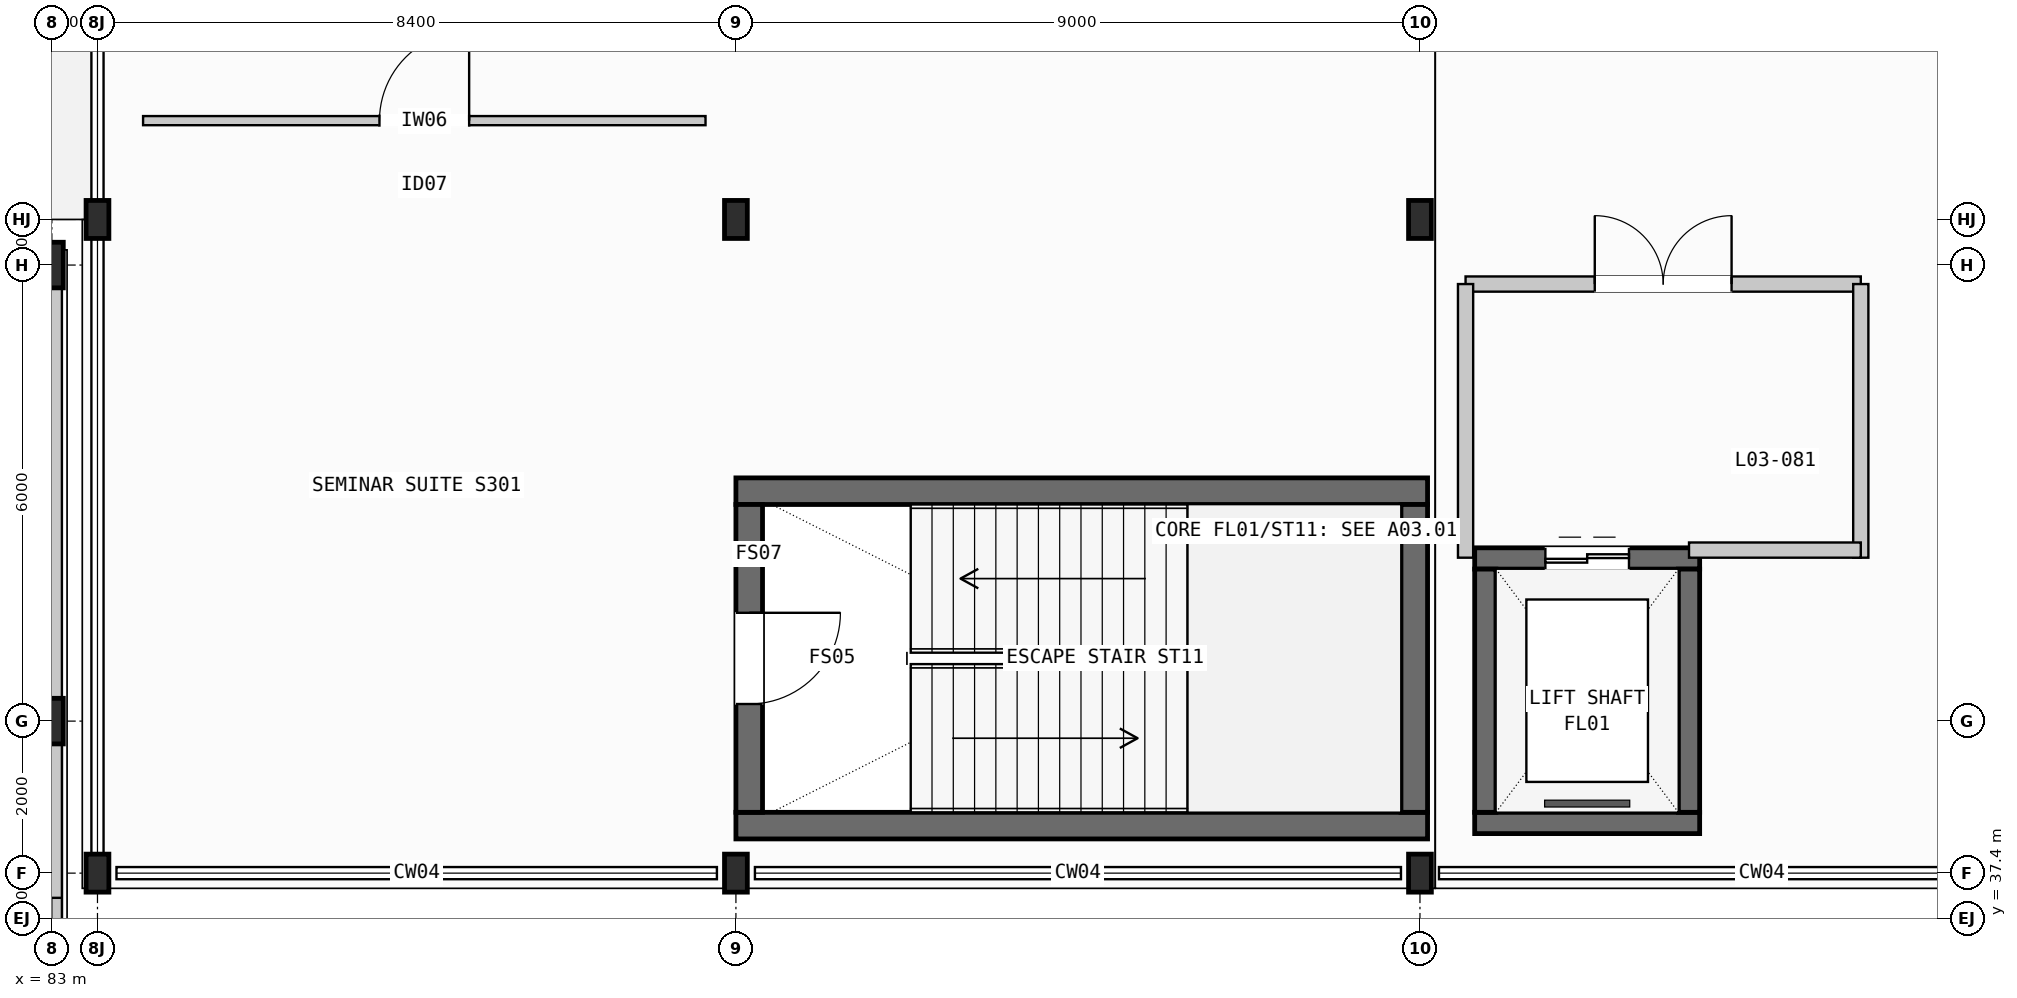
"""IFC4 building model, lengths in metres.
Left out: names, types, materials, properties, quantities, classifications, styles, units other than length and angle.
Written with IfcOpenShell. Run it as: python <this file> out.ifc"""

import sys

from ifc_helpers import new_model, si_unit, direction, frame, frame_2d, origin, origin_2d, place, context, subcontext, project, spatial, rectangle, i_section, extrude, element, fill, save


model = new_model("IFC4")
c1 = context("Model", 3, precision=1e-05, world=origin(), true_north=direction((0.0, 1.0)))
c2 = subcontext(c1, "Body", "Model", "MODEL_VIEW")
j1 = project(units=[si_unit("LENGTHUNIT", "METRE"), si_unit("PLANEANGLEUNIT", "RADIAN")], contexts=[c1])
p1 = place(None, origin())
s1 = spatial("IfcSite", under=j1, at=p1, CompositionType="ELEMENT")
p2 = place(p1, origin())
s2 = spatial("IfcBuilding", under=s1, at=p2, CompositionType="ELEMENT")
p3 = place(p2, frame((0.0, 0.0, 16.8)))
s3 = spatial("IfcBuildingStorey", under=s2, at=p3, CompositionType="ELEMENT", Elevation=16.8)
for number, where, z_axis, x_axis in (
    (1, (83.0, 40.0, 0.0), (0.0, 0.0, 1.0), (1.0, 0.0, 0.0)),
    (2, (83.0, 46.0, 0.0), (0.0, 0.0, 1.0), (1.0, 0.0, 0.0)),
):
    element("IfcColumn", number, at=place(p3, frame(where, z_axis=z_axis, x_axis=x_axis)), inside=s3, PredefinedType="COLUMN", context=c2, shape_type="SweptSolid", body=[
        extrude(i_section(OverallWidth=0.3, OverallDepth=0.6, WebThickness=0.015, FlangeThickness=0.03, FilletRadius=0.027, at=origin_2d()), origin(), (0.0, 0.0, 1.0), 5.2),
    ])
for number, where, z_axis, x_axis in (
    (3, (83.6, 38.0, 0.0), (0.0, 0.0, 1.0), (1.0, 0.0, 0.0)),
    (4, (83.6, 46.6, 0.0), (0.0, 0.0, 1.0), (1.0, 0.0, 0.0)),
    (5, (92.0, 38.0, 0.0), (0.0, 0.0, 1.0), (1.0, 0.0, 0.0)),
    (6, (92.0, 46.6, 0.0), (0.0, 0.0, 1.0), (1.0, 0.0, 0.0)),
    (7, (101.0, 38.0, 0.0), (0.0, 0.0, 1.0), (1.0, 0.0, 0.0)),
    (8, (101.0, 46.6, 0.0), (0.0, 0.0, 1.0), (1.0, 0.0, 0.0)),
):
    element("IfcColumn", number, at=place(p3, frame(where, z_axis=z_axis, x_axis=x_axis)), inside=s3, PredefinedType="COLUMN", context=c2, shape_type="SweptSolid", body=[
        extrude(i_section(OverallWidth=0.3, OverallDepth=0.5, WebThickness=0.014, FlangeThickness=0.028, FilletRadius=0.027, at=origin_2d()), origin(), (0.0, 0.0, 1.0), 4.8),
    ])
for number, where, z_axis, x_axis in (
    (9, (92.0, 38.625, 0.0), (0.0, 0.0, 1.0), (1.0, 0.0, 0.0)),
    (10, (92.0, 43.025, 0.0), (0.0, 0.0, 1.0), (1.0, 0.0, 0.0)),
):
    element("IfcWall", number, at=place(p3, frame(where, z_axis=z_axis, x_axis=x_axis)), inside=s3, PredefinedType="SHEAR", context=c2, shape_type="SweptSolid", body=[
        extrude(rectangle(XDim=9.1, YDim=0.35, at=frame_2d((4.55, 0.0))), origin(), (0.0, 0.0, 1.0), 4.8),
    ])
p4 = place(p3, frame((92.175, 38.8, 0.0), z_axis=(0.0, 0.0, 1.0), x_axis=(0.0, 1.0, 0.0)))
e11 = element("IfcWall", 11, at=p4, inside=s3, PredefinedType="SHEAR", context=c2, shape_type="SweptSolid", body=[
    extrude(rectangle(XDim=4.05, YDim=0.35, at=frame_2d((2.025, 0.0))), origin(), (0.0, 0.0, 1.0), 4.8),
])
p5 = place(p4, frame((1.425, 0.0, 0.0)))
e12 = element("IfcOpeningElement", 12, at=p5, cuts=e11, PredefinedType="OPENING", context=c2, shape_type="SweptSolid", body=[
    extrude(rectangle(XDim=1.2, YDim=2.2, at=frame_2d((0.6, 1.1))), frame((0.0, 0.185, 0.0), z_axis=(0.0, -1.0, 0.0), x_axis=(1.0, 0.0, 0.0)), (0.0, 0.0, 1.0), 0.37),
])
p6 = place(p3, frame((100.925, 38.8, 0.0), z_axis=(0.0, 0.0, 1.0), x_axis=(0.0, 1.0, 0.0)))
e13 = element("IfcWall", 13, at=p6, inside=s3, PredefinedType="SHEAR", context=c2, shape_type="SweptSolid", body=[
    extrude(rectangle(XDim=4.05, YDim=0.35, at=frame_2d((2.025, 0.0))), origin(), (0.0, 0.0, 1.0), 4.8),
])
p7 = place(p3, frame((101.72, 38.66, 0.0), z_axis=(0.0, 0.0, 1.0), x_axis=(1.0, 0.0, 0.0)))
e14 = element("IfcWall", 14, at=p7, inside=s3, PredefinedType="SHEAR", context=c2, shape_type="SweptSolid", body=[
    extrude(rectangle(XDim=2.96, YDim=0.28, at=frame_2d((1.48, 0.0))), origin(), (0.0, 0.0, 1.0), 4.8),
])
p8 = place(p3, frame((101.72, 42.14, 0.0), z_axis=(0.0, 0.0, 1.0), x_axis=(1.0, 0.0, 0.0)))
e15 = element("IfcWall", 15, at=p8, inside=s3, PredefinedType="SHEAR", context=c2, shape_type="SweptSolid", body=[
    extrude(rectangle(XDim=2.96, YDim=0.28, at=frame_2d((1.48, 0.0))), origin(), (0.0, 0.0, 1.0), 4.8),
])
p9 = place(p8, frame((0.93, 0.0, 0.0)))
e16 = element("IfcOpeningElement", 16, at=p9, cuts=e15, PredefinedType="OPENING", context=c2, shape_type="SweptSolid", body=[
    extrude(rectangle(XDim=1.1, YDim=2.15, at=frame_2d((0.55, 1.075))), frame((0.0, 0.15, 0.0), z_axis=(0.0, -1.0, 0.0), x_axis=(1.0, 0.0, 0.0)), (0.0, 0.0, 1.0), 0.3),
])
for number, where, z_axis, x_axis in (
    (17, (101.86, 38.8, 0.0), (0.0, 0.0, 1.0), (0.0, 1.0, 0.0)),
    (18, (104.54, 38.8, 0.0), (0.0, 0.0, 1.0), (0.0, 1.0, 0.0)),
):
    element("IfcWall", number, at=place(p3, frame(where, z_axis=z_axis, x_axis=x_axis)), inside=s3, PredefinedType="SHEAR", context=c2, shape_type="SweptSolid", body=[
        extrude(rectangle(XDim=3.2, YDim=0.28, at=frame_2d((1.6, 0.0))), origin(), (0.0, 0.0, 1.0), 4.8),
    ])
p10 = place(p3, frame((83.0, 34.296, 0.0), z_axis=(0.0, 0.0, 1.0), x_axis=(0.0, 1.0, 0.0)))
e19 = element("IfcWall", 19, at=p10, inside=s3, PredefinedType="STANDARD", context=c2, shape_type="SweptSolid", body=[
    extrude(rectangle(XDim=5.408, YDim=0.264, at=frame_2d((2.704, 0.0))), origin(), (0.0, 0.0, 1.0), 4.145),
])
p11 = place(p10, frame((2.029, 0.0, 1.0)))
e20 = element("IfcOpeningElement", 20, at=p11, cuts=e19, PredefinedType="OPENING", context=c2, shape_type="SweptSolid", body=[
    extrude(rectangle(XDim=1.35, YDim=1.65, at=frame_2d((0.675, 0.825))), frame((0.0, 0.142, 0.0), z_axis=(0.0, -1.0, 0.0), x_axis=(1.0, 0.0, 0.0)), (0.0, 0.0, 1.0), 0.284),
])
p12 = place(p3, frame((83.0, 40.296, 0.0), z_axis=(0.0, 0.0, 1.0), x_axis=(0.0, 1.0, 0.0)))
e21 = element("IfcWall", 21, at=p12, inside=s3, PredefinedType="STANDARD", context=c2, shape_type="SweptSolid", body=[
    extrude(rectangle(XDim=5.408, YDim=0.264, at=frame_2d((2.704, 0.0))), origin(), (0.0, 0.0, 1.0), 4.155),
])
p13 = place(p3, frame((83.0, 34.14, 4.395), z_axis=(0.0, 0.0, 1.0), x_axis=(0.0, 1.0, 0.0)))
e22 = element("IfcWall", 22, at=p13, inside=s3, PredefinedType="STANDARD", context=c2, shape_type="SweptSolid", body=[
    extrude(rectangle(XDim=5.72, YDim=0.264, at=frame_2d((2.86, 0.0))), origin(), (0.0, 0.0, 1.0), 0.475),
])
p14 = place(p3, frame((101.6, 45.75, 0.0), z_axis=(0.0, 0.0, 1.0), x_axis=(1.0, 0.0, 0.0)))
e23 = element("IfcWall", 23, at=p14, inside=s3, PredefinedType="PARTITIONING", context=c2, shape_type="SweptSolid", body=[
    extrude(rectangle(XDim=5.2, YDim=0.2, at=frame_2d((2.6, 0.0))), origin(), (0.0, 0.0, 1.0), 4.0),
])
p15 = place(p14, frame((1.7, 0.0, 0.0)))
e24 = element("IfcOpeningElement", 24, at=p15, cuts=e23, PredefinedType="OPENING", context=c2, shape_type="SweptSolid", body=[
    extrude(rectangle(XDim=1.8, YDim=2.2, at=frame_2d((0.9, 1.1))), frame((0.0, 0.11, 0.0), z_axis=(0.0, -1.0, 0.0), x_axis=(1.0, 0.0, 0.0)), (0.0, 0.0, 1.0), 0.22),
])
for number, where, z_axis, x_axis in (
    (25, (101.6, 42.15, 0.0), (0.0, 0.0, 1.0), (0.0, 1.0, 0.0)),
    (26, (106.8, 42.15, 0.0), (0.0, 0.0, 1.0), (0.0, 1.0, 0.0)),
):
    element("IfcWall", number, at=place(p3, frame(where, z_axis=z_axis, x_axis=x_axis)), inside=s3, PredefinedType="PARTITIONING", context=c2, shape_type="SweptSolid", body=[
        extrude(rectangle(XDim=3.6, YDim=0.2, at=frame_2d((1.8, 0.0))), origin(), (0.0, 0.0, 1.0), 4.0),
    ])
p16 = place(p3, frame((104.54, 42.25, 0.0), z_axis=(0.0, 0.0, 1.0), x_axis=(1.0, 0.0, 0.0)))
e27 = element("IfcWall", 27, at=p16, inside=s3, PredefinedType="PARTITIONING", context=c2, shape_type="SweptSolid", body=[
    extrude(rectangle(XDim=2.26, YDim=0.2, at=frame_2d((1.13, 0.0))), origin(), (0.0, 0.0, 1.0), 4.0),
])
p17 = place(p3, frame((84.2, 47.9, 0.0), z_axis=(0.0, 0.0, 1.0), x_axis=(1.0, 0.0, 0.0)))
e28 = element("IfcWall", 28, at=p17, inside=s3, PredefinedType="PARTITIONING", context=c2, shape_type="SweptSolid", body=[
    extrude(rectangle(XDim=7.4, YDim=0.12, at=frame_2d((3.7, 0.0))), origin(), (0.0, 0.0, 1.0), 4.0),
])
p18 = place(p17, frame((3.11, 0.0, 0.0)))
e29 = element("IfcOpeningElement", 29, at=p18, cuts=e28, PredefinedType="OPENING", context=c2, shape_type="SweptSolid", body=[
    extrude(rectangle(XDim=1.18, YDim=2.25, at=frame_2d((0.59, 1.125))), frame((0.0, 0.07, 0.0), z_axis=(0.0, -1.0, 0.0), x_axis=(1.0, 0.0, 0.0)), (0.0, 0.0, 1.0), 0.14),
])
p19 = place(p11, origin())
e30 = element("IfcWindow", 30, at=p19, inside=s3, PartitioningType="SINGLE_PANEL", PredefinedType="WINDOW", context=c2, shape_type="SweptSolid", body=[
    extrude(rectangle(XDim=1.35, YDim=1.65, at=frame_2d((0.675, 0.825))), frame((0.0, 0.03, 0.0), z_axis=(0.0, -1.0, 0.0), x_axis=(1.0, 0.0, 0.0)), (0.0, 0.0, 1.0), 0.06),
])
fill(e20, e30)
p20 = place(p5, frame((1.2, 0.0, 0.0), z_axis=(0.0, 0.0, 1.0), x_axis=(-1.0, 0.0, 0.0)))
e31 = element("IfcDoor", 31, at=p20, inside=s3, OperationType="SINGLE_SWING_LEFT", PredefinedType="DOOR", context=c2, shape_type="SweptSolid", body=[
    extrude(rectangle(XDim=1.2, YDim=2.2, at=frame_2d((0.6, 1.1))), frame((0.0, 0.025, 0.0), z_axis=(0.0, -1.0, 0.0), x_axis=(1.0, 0.0, 0.0)), (0.0, 0.0, 1.0), 0.05),
])
fill(e12, e31)
p21 = place(p9, origin())
e32 = element("IfcDoor", 32, at=p21, inside=s3, OperationType="DOUBLE_DOOR_SLIDING", PredefinedType="DOOR", context=c2, shape_type="SweptSolid", body=[
    extrude(rectangle(XDim=1.1, YDim=2.15, at=frame_2d((0.55, 1.075))), frame((0.0, 0.025, 0.0), z_axis=(0.0, -1.0, 0.0), x_axis=(1.0, 0.0, 0.0)), (0.0, 0.0, 1.0), 0.05),
])
fill(e16, e32)
p22 = place(p15, origin())
e33 = element("IfcDoor", 33, at=p22, inside=s3, OperationType="DOUBLE_DOOR_SINGLE_SWING", PredefinedType="DOOR", context=c2, shape_type="SweptSolid", body=[
    extrude(rectangle(XDim=1.8, YDim=2.2, at=frame_2d((0.9, 1.1))), frame((0.0, 0.025, 0.0), z_axis=(0.0, -1.0, 0.0), x_axis=(1.0, 0.0, 0.0)), (0.0, 0.0, 1.0), 0.05),
])
fill(e24, e33)
p23 = place(p18, origin())
e34 = element("IfcDoor", 34, at=p23, inside=s3, OperationType="SINGLE_SWING_RIGHT", PredefinedType="DOOR", context=c2, shape_type="SweptSolid", body=[
    extrude(rectangle(XDim=1.18, YDim=2.25, at=frame_2d((0.59, 1.125))), frame((0.0, 0.025, 0.0), z_axis=(0.0, -1.0, 0.0), x_axis=(1.0, 0.0, 0.0)), (0.0, 0.0, 1.0), 0.05),
])
fill(e29, e34)
save(model, sys.argv[1])
